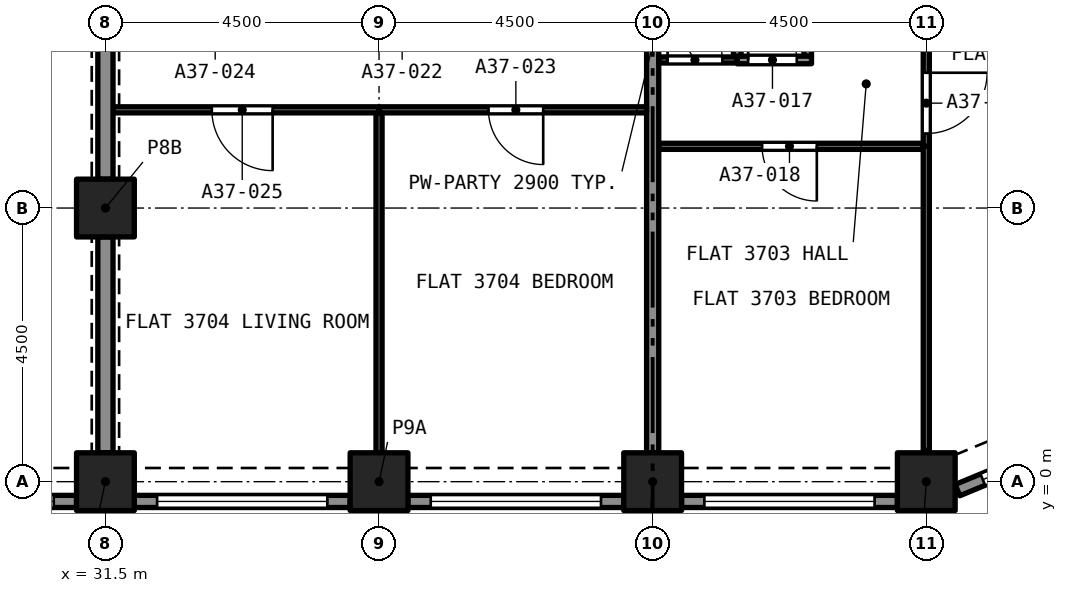
"""IFC4 building model, lengths in metres.
Left out: names, types, materials, properties, quantities, classifications, styles, units other than length and angle.
Written with IfcOpenShell. Run it as: python <this file> out.ifc"""

import sys

from ifc_helpers import new_model, si_unit, direction, frame, frame_2d, origin, origin_2d, place, context, subcontext, project, spatial, rectangle, extrude, element, fill, save


model = new_model("IFC4")
c1 = context("Model", 3, precision=1e-05, world=origin(), true_north=direction((0.0, 1.0)))
c2 = subcontext(c1, "Body", "Model", "MODEL_VIEW")
j1 = project(units=[si_unit("LENGTHUNIT", "METRE"), si_unit("PLANEANGLEUNIT", "RADIAN")], contexts=[c1])
p1 = place(None, origin())
s1 = spatial("IfcSite", under=j1, at=p1, CompositionType="ELEMENT")
p2 = place(p1, origin())
s2 = spatial("IfcBuilding", under=s1, at=p2, CompositionType="ELEMENT")
p3 = place(p2, frame((0.0, 0.0, 133.4)))
s3 = spatial("IfcBuildingStorey", under=s2, at=p3, CompositionType="ELEMENT", Elevation=133.4)
for number, where, z_axis, x_axis in (
    (1, (31.5, 0.0, 0.0), (0.0, 0.0, 1.0), (1.0, 0.0, 0.0)),
    (2, (36.0, 0.0, 0.0), (0.0, 0.0, 1.0), (1.0, 0.0, 0.0)),
    (3, (40.5, 0.0, 0.0), (0.0, 0.0, 1.0), (1.0, 0.0, 0.0)),
    (4, (45.0, 0.0, 0.0), (0.0, 0.0, 1.0), (1.0, 0.0, 0.0)),
    (5, (31.5, 4.5, 0.0), (0.0, 0.0, 1.0), (1.0, 0.0, 0.0)),
):
    element("IfcColumn", number, at=place(p3, frame(where, z_axis=z_axis, x_axis=x_axis)), inside=s3, PredefinedType="COLUMN", context=c2, shape_type="SweptSolid", body=[
        extrude(rectangle(XDim=0.95, YDim=0.95, at=origin_2d()), origin(), (0.0, 0.0, 1.0), 3.2),
    ])
p4 = place(p3, frame((31.025, -0.325, 0.0), z_axis=(0.0, 0.0, 1.0), x_axis=(-1.0, 0.0, 0.0)))
e6 = element("IfcWall", 6, at=p4, inside=s3, PredefinedType="SOLIDWALL", context=c2, shape_type="SweptSolid", body=[
    extrude(rectangle(XDim=3.55, YDim=0.2, at=frame_2d((1.775, 0.0))), origin(), (0.0, 0.0, 1.0), 3.2),
])
p5 = place(p4, frame((0.375, 0.0, 0.45)))
e7 = element("IfcOpeningElement", 7, at=p5, cuts=e6, PredefinedType="OPENING", context=c2, shape_type="SweptSolid", body=[
    extrude(rectangle(XDim=2.8, YDim=1.95, at=frame_2d((1.4, 0.975))), frame((0.0, 0.11, 0.0), z_axis=(0.0, -1.0, 0.0), x_axis=(1.0, 0.0, 0.0)), (0.0, 0.0, 1.0), 0.22),
])
p6 = place(p3, frame((35.525, -0.325, 0.0), z_axis=(0.0, 0.0, 1.0), x_axis=(-1.0, 0.0, 0.0)))
e8 = element("IfcWall", 8, at=p6, inside=s3, PredefinedType="SOLIDWALL", context=c2, shape_type="SweptSolid", body=[
    extrude(rectangle(XDim=3.55, YDim=0.2, at=frame_2d((1.775, 0.0))), origin(), (0.0, 0.0, 1.0), 3.2),
])
p7 = place(p6, frame((0.375, 0.0, 0.45)))
e9 = element("IfcOpeningElement", 9, at=p7, cuts=e8, PredefinedType="OPENING", context=c2, shape_type="SweptSolid", body=[
    extrude(rectangle(XDim=2.8, YDim=1.95, at=frame_2d((1.4, 0.975))), frame((0.0, 0.11, 0.0), z_axis=(0.0, -1.0, 0.0), x_axis=(1.0, 0.0, 0.0)), (0.0, 0.0, 1.0), 0.22),
])
p8 = place(p3, frame((40.025, -0.325, 0.0), z_axis=(0.0, 0.0, 1.0), x_axis=(-1.0, 0.0, 0.0)))
e10 = element("IfcWall", 10, at=p8, inside=s3, PredefinedType="SOLIDWALL", context=c2, shape_type="SweptSolid", body=[
    extrude(rectangle(XDim=3.55, YDim=0.2, at=frame_2d((1.775, 0.0))), origin(), (0.0, 0.0, 1.0), 3.2),
])
p9 = place(p8, frame((0.375, 0.0, 0.45)))
e11 = element("IfcOpeningElement", 11, at=p9, cuts=e10, PredefinedType="OPENING", context=c2, shape_type="SweptSolid", body=[
    extrude(rectangle(XDim=2.8, YDim=1.95, at=frame_2d((1.4, 0.975))), frame((0.0, 0.11, 0.0), z_axis=(0.0, -1.0, 0.0), x_axis=(1.0, 0.0, 0.0)), (0.0, 0.0, 1.0), 0.22),
])
p10 = place(p3, frame((44.525, -0.325, 0.0), z_axis=(0.0, 0.0, 1.0), x_axis=(-1.0, 0.0, 0.0)))
e12 = element("IfcWall", 12, at=p10, inside=s3, PredefinedType="SOLIDWALL", context=c2, shape_type="SweptSolid", body=[
    extrude(rectangle(XDim=3.55, YDim=0.2, at=frame_2d((1.775, 0.0))), origin(), (0.0, 0.0, 1.0), 3.2),
])
p11 = place(p10, frame((0.375, 0.0, 0.45)))
e13 = element("IfcOpeningElement", 13, at=p11, cuts=e12, PredefinedType="OPENING", context=c2, shape_type="SweptSolid", body=[
    extrude(rectangle(XDim=2.8, YDim=1.95, at=frame_2d((1.4, 0.975))), frame((0.0, 0.11, 0.0), z_axis=(0.0, -1.0, 0.0), x_axis=(1.0, 0.0, 0.0)), (0.0, 0.0, 1.0), 0.22),
])
p12 = place(p3, frame((47.733, 0.78, 0.0), z_axis=(0.0, 0.0, 1.0), x_axis=(-0.923880599843, -0.382680855588, 0.0)))
e14 = element("IfcWall", 14, at=p12, inside=s3, PredefinedType="SOLIDWALL", context=c2, shape_type="SweptSolid", body=[
    extrude(rectangle(XDim=2.403, YDim=0.2, at=frame_2d((1.201, 0.0))), origin(), (0.0, 0.0, 1.0), 3.2),
])
p13 = place(p12, frame((0.251, 0.0, 0.45)))
e15 = element("IfcOpeningElement", 15, at=p13, cuts=e14, PredefinedType="OPENING", context=c2, shape_type="SweptSolid", body=[
    extrude(rectangle(XDim=1.7, YDim=1.95, at=frame_2d((0.85, 0.975))), frame((0.0, 0.11, 0.0), z_axis=(0.0, -1.0, 0.0), x_axis=(1.0, 0.0, 0.0)), (0.0, 0.0, 1.0), 0.22),
])
p14 = place(p3, frame((43.05, 6.998, 0.0), z_axis=(0.0, 0.0, 1.0), x_axis=(0.0, 1.0, 0.0)))
e16 = element("IfcWall", 16, at=p14, inside=s3, PredefinedType="PARTITIONING", context=c2, shape_type="SweptSolid", body=[
    extrude(rectangle(XDim=6.902, YDim=0.125, at=frame_2d((3.451, 0.0))), origin(), (0.0, 0.0, 1.0), 2.9),
])
p15 = place(p3, frame((41.891, 6.935, 0.0), z_axis=(0.0, 0.0, 1.0), x_axis=(1.0, 0.0, 0.0)))
e17 = element("IfcWall", 17, at=p15, inside=s3, PredefinedType="PARTITIONING", context=c2, shape_type="SweptSolid", body=[
    extrude(rectangle(XDim=1.222, YDim=0.125, at=frame_2d((0.611, 0.0))), origin(), (0.0, 0.0, 1.0), 2.9),
])
p16 = place(p15, frame((0.179, 0.0, 0.0)))
e18 = element("IfcOpeningElement", 18, at=p16, cuts=e17, PredefinedType="OPENING", context=c2, shape_type="SweptSolid", body=[
    extrude(rectangle(XDim=0.8, YDim=2.1, at=frame_2d((0.4, 1.05))), frame((0.0, 0.073, 0.0), z_axis=(0.0, -1.0, 0.0), x_axis=(1.0, 0.0, 0.0)), (0.0, 0.0, 1.0), 0.145),
])
p17 = place(p3, frame((41.891, 6.998, 0.0), z_axis=(0.0, 0.0, 1.0), x_axis=(0.0, 1.0, 0.0)))
e19 = element("IfcWall", 19, at=p17, inside=s3, PredefinedType="PARTITIONING", context=c2, shape_type="SweptSolid", body=[
    extrude(rectangle(XDim=6.902, YDim=0.125, at=frame_2d((3.451, 0.0))), origin(), (0.0, 0.0, 1.0), 2.9),
])
p18 = place(p3, frame((44.95, 5.515, 0.0), z_axis=(0.0, 0.0, 1.0), x_axis=(-1.0, 0.0, 0.0)))
e20 = element("IfcWall", 20, at=p18, inside=s3, PredefinedType="PARTITIONING", context=c2, shape_type="SweptSolid", body=[
    extrude(rectangle(XDim=4.35, YDim=0.1, at=frame_2d((2.175, 0.0))), origin(), (0.0, 0.0, 1.0), 2.9),
])
p19 = place(p18, frame((1.75, 0.0, 0.0)))
e21 = element("IfcOpeningElement", 21, at=p19, cuts=e20, PredefinedType="OPENING", context=c2, shape_type="SweptSolid", body=[
    extrude(rectangle(XDim=0.9, YDim=2.1, at=frame_2d((0.45, 1.05))), frame((0.0, 0.06, 0.0), z_axis=(0.0, -1.0, 0.0), x_axis=(1.0, 0.0, 0.0)), (0.0, 0.0, 1.0), 0.12),
])
p20 = place(p3, frame((45.0, 0.514, 0.0), z_axis=(0.0, 0.0, 1.0), x_axis=(0.0, 1.0, 0.0)))
e22 = element("IfcWall", 22, at=p20, inside=s3, PredefinedType="PARTITIONING", context=c2, shape_type="SweptSolid", body=[
    extrude(rectangle(XDim=5.001, YDim=0.1, at=frame_2d((2.5, 0.0))), origin(), (0.0, 0.0, 1.0), 2.9),
])
p21 = place(p3, frame((40.5, 0.475, 0.0), z_axis=(0.0, 0.0, 1.0), x_axis=(0.0, 1.0, 0.0)))
e23 = element("IfcWall", 23, at=p21, inside=s3, PredefinedType="PARTITIONING", context=c2, shape_type="SweptSolid", body=[
    extrude(rectangle(XDim=13.425, YDim=0.2, at=frame_2d((6.712, 0.0))), origin(), (0.0, 0.0, 1.0), 2.9),
])
p22 = place(p3, frame((40.6, 6.935, 0.0), z_axis=(0.0, 0.0, 1.0), x_axis=(1.0, 0.0, 0.0)))
e24 = element("IfcWall", 24, at=p22, inside=s3, PredefinedType="PARTITIONING", context=c2, shape_type="SweptSolid", body=[
    extrude(rectangle(XDim=1.291, YDim=0.1, at=frame_2d((0.646, 0.0))), origin(), (0.0, 0.0, 1.0), 2.9),
])
p23 = place(p22, frame((0.146, 0.0, 0.0)))
e25 = element("IfcOpeningElement", 25, at=p23, cuts=e24, PredefinedType="OPENING", context=c2, shape_type="SweptSolid", body=[
    extrude(rectangle(XDim=0.9, YDim=2.1, at=frame_2d((0.45, 1.05))), frame((0.0, 0.06, 0.0), z_axis=(0.0, -1.0, 0.0), x_axis=(1.0, 0.0, 0.0)), (0.0, 0.0, 1.0), 0.12),
])
p24 = place(p3, frame((45.0, 13.9, 0.0), z_axis=(0.0, 0.0, 1.0), x_axis=(0.0, -1.0, 0.0)))
e26 = element("IfcWall", 26, at=p24, inside=s3, PredefinedType="PARTITIONING", context=c2, shape_type="SweptSolid", body=[
    extrude(rectangle(XDim=8.385, YDim=0.1, at=frame_2d((4.192, 0.0))), origin(), (0.0, 0.0, 1.0), 2.9),
])
p25 = place(p24, frame((7.175, 0.0, 0.0)))
e27 = element("IfcOpeningElement", 27, at=p25, cuts=e26, PredefinedType="OPENING", context=c2, shape_type="SweptSolid", body=[
    extrude(rectangle(XDim=1.0, YDim=2.1, at=frame_2d((0.5, 1.05))), frame((0.0, 0.06, 0.0), z_axis=(0.0, -1.0, 0.0), x_axis=(1.0, 0.0, 0.0)), (0.0, 0.0, 1.0), 0.12),
])
p26 = place(p3, frame((40.4, 6.115, 0.0), z_axis=(0.0, 0.0, 1.0), x_axis=(-1.0, 0.0, 0.0)))
e28 = element("IfcWall", 28, at=p26, inside=s3, PredefinedType="PARTITIONING", context=c2, shape_type="SweptSolid", body=[
    extrude(rectangle(XDim=4.4, YDim=0.1, at=frame_2d((2.2, 0.0))), origin(), (0.0, 0.0, 1.0), 2.9),
])
p27 = place(p26, frame((1.7, 0.0, 0.0)))
e29 = element("IfcOpeningElement", 29, at=p27, cuts=e28, PredefinedType="OPENING", context=c2, shape_type="SweptSolid", body=[
    extrude(rectangle(XDim=0.9, YDim=2.1, at=frame_2d((0.45, 1.05))), frame((0.0, 0.06, 0.0), z_axis=(0.0, -1.0, 0.0), x_axis=(1.0, 0.0, 0.0)), (0.0, 0.0, 1.0), 0.12),
])
p28 = place(p3, frame((36.0, 0.475, 0.0), z_axis=(0.0, 0.0, 1.0), x_axis=(0.0, 1.0, 0.0)))
e30 = element("IfcWall", 30, at=p28, inside=s3, PredefinedType="PARTITIONING", context=c2, shape_type="SweptSolid", body=[
    extrude(rectangle(XDim=5.59, YDim=0.1, at=frame_2d((2.795, 0.0))), origin(), (0.0, 0.0, 1.0), 2.9),
])
p29 = place(p3, frame((36.0, 6.115, 0.0), z_axis=(0.0, 0.0, 1.0), x_axis=(-1.0, 0.0, 0.0)))
e31 = element("IfcWall", 31, at=p29, inside=s3, PredefinedType="PARTITIONING", context=c2, shape_type="SweptSolid", body=[
    extrude(rectangle(XDim=4.375, YDim=0.1, at=frame_2d((2.188, 0.0))), origin(), (0.0, 0.0, 1.0), 2.9),
])
p30 = place(p29, frame((1.75, 0.0, 0.0)))
e32 = element("IfcOpeningElement", 32, at=p30, cuts=e31, PredefinedType="OPENING", context=c2, shape_type="SweptSolid", body=[
    extrude(rectangle(XDim=1.0, YDim=2.1, at=frame_2d((0.5, 1.05))), frame((0.0, 0.06, 0.0), z_axis=(0.0, -1.0, 0.0), x_axis=(1.0, 0.0, 0.0)), (0.0, 0.0, 1.0), 0.12),
])
for number, where, z_axis, x_axis in (
    (33, (31.5, 0.475, 0.0), (0.0, 0.0, 1.0), (0.0, 1.0, 0.0)),
    (34, (31.5, 4.975, 0.0), (0.0, 0.0, 1.0), (0.0, 1.0, 0.0)),
):
    element("IfcWall", number, at=place(p3, frame(where, z_axis=z_axis, x_axis=x_axis)), inside=s3, PredefinedType="PARTITIONING", context=c2, shape_type="SweptSolid", body=[
        extrude(rectangle(XDim=3.55, YDim=0.25, at=frame_2d((1.775, 0.0))), origin(), (0.0, 0.0, 1.0), 2.38),
    ])
p31 = place(p5, origin())
e35 = element("IfcWindow", 35, at=p31, inside=s3, PartitioningType="SINGLE_PANEL", PredefinedType="WINDOW", context=c2, shape_type="SweptSolid", body=[
    extrude(rectangle(XDim=2.8, YDim=1.95, at=frame_2d((1.4, 0.975))), frame((0.0, 0.03, 0.0), z_axis=(0.0, -1.0, 0.0), x_axis=(1.0, 0.0, 0.0)), (0.0, 0.0, 1.0), 0.06),
])
fill(e7, e35)
p32 = place(p7, origin())
e36 = element("IfcWindow", 36, at=p32, inside=s3, PartitioningType="SINGLE_PANEL", PredefinedType="WINDOW", context=c2, shape_type="SweptSolid", body=[
    extrude(rectangle(XDim=2.8, YDim=1.95, at=frame_2d((1.4, 0.975))), frame((0.0, 0.03, 0.0), z_axis=(0.0, -1.0, 0.0), x_axis=(1.0, 0.0, 0.0)), (0.0, 0.0, 1.0), 0.06),
])
fill(e9, e36)
p33 = place(p9, origin())
e37 = element("IfcWindow", 37, at=p33, inside=s3, PartitioningType="SINGLE_PANEL", PredefinedType="WINDOW", context=c2, shape_type="SweptSolid", body=[
    extrude(rectangle(XDim=2.8, YDim=1.95, at=frame_2d((1.4, 0.975))), frame((0.0, 0.03, 0.0), z_axis=(0.0, -1.0, 0.0), x_axis=(1.0, 0.0, 0.0)), (0.0, 0.0, 1.0), 0.06),
])
fill(e11, e37)
p34 = place(p11, origin())
e38 = element("IfcWindow", 38, at=p34, inside=s3, PartitioningType="SINGLE_PANEL", PredefinedType="WINDOW", context=c2, shape_type="SweptSolid", body=[
    extrude(rectangle(XDim=2.8, YDim=1.95, at=frame_2d((1.4, 0.975))), frame((0.0, 0.03, 0.0), z_axis=(0.0, -1.0, 0.0), x_axis=(1.0, 0.0, 0.0)), (0.0, 0.0, 1.0), 0.06),
])
fill(e13, e38)
p35 = place(p13, origin())
e39 = element("IfcWindow", 39, at=p35, inside=s3, PartitioningType="SINGLE_PANEL", PredefinedType="WINDOW", context=c2, shape_type="SweptSolid", body=[
    extrude(rectangle(XDim=1.7, YDim=1.95, at=frame_2d((0.85, 0.975))), frame((0.0, 0.03, 0.0), z_axis=(0.0, -1.0, 0.0), x_axis=(1.0, 0.0, 0.0)), (0.0, 0.0, 1.0), 0.06),
])
fill(e15, e39)
p36 = place(p16, origin())
e40 = element("IfcDoor", 40, at=p36, inside=s3, OperationType="SINGLE_SWING_LEFT", PredefinedType="DOOR", context=c2, shape_type="SweptSolid", body=[
    extrude(rectangle(XDim=0.8, YDim=2.1, at=frame_2d((0.4, 1.05))), frame((0.0, 0.025, 0.0), z_axis=(0.0, -1.0, 0.0), x_axis=(1.0, 0.0, 0.0)), (0.0, 0.0, 1.0), 0.05),
])
fill(e18, e40)
p37 = place(p19, origin())
e41 = element("IfcDoor", 41, at=p37, inside=s3, OperationType="SINGLE_SWING_RIGHT", PredefinedType="DOOR", context=c2, shape_type="SweptSolid", body=[
    extrude(rectangle(XDim=0.9, YDim=2.1, at=frame_2d((0.45, 1.05))), frame((0.0, 0.025, 0.0), z_axis=(0.0, -1.0, 0.0), x_axis=(1.0, 0.0, 0.0)), (0.0, 0.0, 1.0), 0.05),
])
fill(e21, e41)
p38 = place(p23, origin())
e42 = element("IfcDoor", 42, at=p38, inside=s3, OperationType="SINGLE_SWING_LEFT", PredefinedType="DOOR", context=c2, shape_type="SweptSolid", body=[
    extrude(rectangle(XDim=0.9, YDim=2.1, at=frame_2d((0.45, 1.05))), frame((0.0, 0.025, 0.0), z_axis=(0.0, -1.0, 0.0), x_axis=(1.0, 0.0, 0.0)), (0.0, 0.0, 1.0), 0.05),
])
fill(e25, e42)
p39 = place(p25, origin())
e43 = element("IfcDoor", 43, at=p39, inside=s3, OperationType="SINGLE_SWING_RIGHT", PredefinedType="DOOR", context=c2, shape_type="SweptSolid", body=[
    extrude(rectangle(XDim=1.0, YDim=2.1, at=frame_2d((0.5, 1.05))), frame((0.0, 0.025, 0.0), z_axis=(0.0, -1.0, 0.0), x_axis=(1.0, 0.0, 0.0)), (0.0, 0.0, 1.0), 0.05),
])
fill(e27, e43)
p40 = place(p27, origin())
e44 = element("IfcDoor", 44, at=p40, inside=s3, OperationType="SINGLE_SWING_LEFT", PredefinedType="DOOR", context=c2, shape_type="SweptSolid", body=[
    extrude(rectangle(XDim=0.9, YDim=2.1, at=frame_2d((0.45, 1.05))), frame((0.0, 0.025, 0.0), z_axis=(0.0, -1.0, 0.0), x_axis=(1.0, 0.0, 0.0)), (0.0, 0.0, 1.0), 0.05),
])
fill(e29, e44)
p41 = place(p30, origin())
e45 = element("IfcDoor", 45, at=p41, inside=s3, OperationType="SINGLE_SWING_RIGHT", PredefinedType="DOOR", context=c2, shape_type="SweptSolid", body=[
    extrude(rectangle(XDim=1.0, YDim=2.1, at=frame_2d((0.5, 1.05))), frame((0.0, 0.025, 0.0), z_axis=(0.0, -1.0, 0.0), x_axis=(1.0, 0.0, 0.0)), (0.0, 0.0, 1.0), 0.05),
])
fill(e32, e45)
save(model, sys.argv[1])
